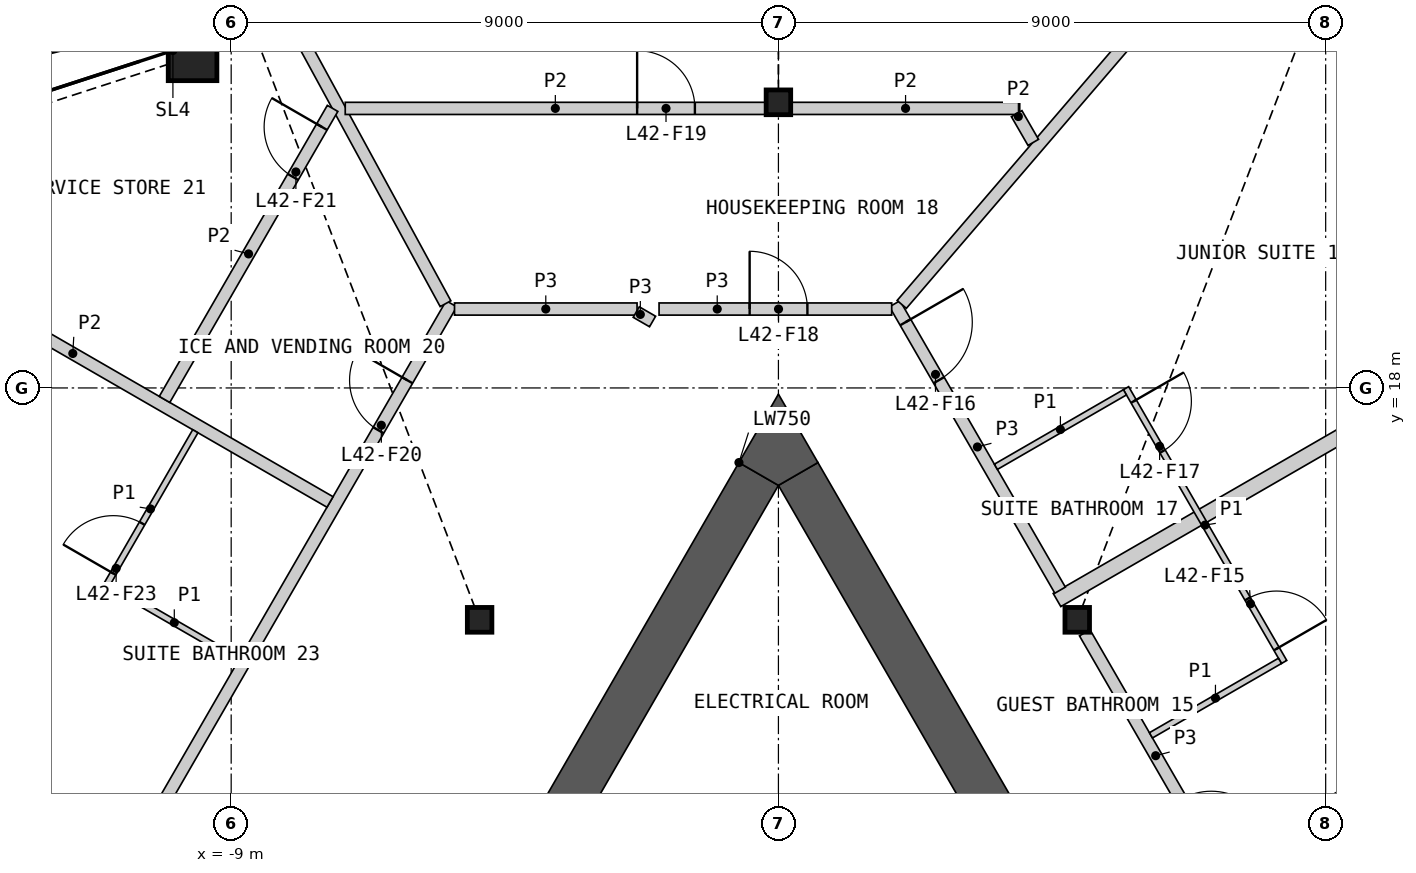
"""IFC4 building model, lengths in metres.
Left out: names, types, materials, properties, quantities, classifications, styles, units other than length and angle.
Written with IfcOpenShell. Run it as: python <this file> out.ifc"""

import sys

from ifc_helpers import new_model, si_unit, direction, frame, frame_2d, origin, origin_2d, place, context, subcontext, project, spatial, polyline, rectangle, hollow_rectangle, i_section, outline, extrude, element, fill, save


model = new_model("IFC4")
c1 = context("Model", 3, precision=1e-05, world=origin(), true_north=direction((0.0, 1.0)))
c2 = subcontext(c1, "Body", "Model", "MODEL_VIEW")
j1 = project(units=[si_unit("LENGTHUNIT", "METRE"), si_unit("PLANEANGLEUNIT", "RADIAN")], contexts=[c1])
p1 = place(None, origin())
s1 = spatial("IfcSite", under=j1, at=p1, CompositionType="ELEMENT")
p2 = place(p1, origin())
s2 = spatial("IfcBuilding", under=s1, at=p2, CompositionType="ELEMENT")
p3 = place(p2, frame((0.0, 0.0, 194.4)))
s3 = spatial("IfcBuildingStorey", under=s2, at=p3, CompositionType="ELEMENT", Elevation=194.4)
p4 = place(p3, frame((-9.635, 23.454, 0.0), z_axis=(0.0, 0.0, 1.0), x_axis=(1.0, 0.0, 0.0)))
e1 = element("IfcColumn", 1, at=p4, inside=s3, PredefinedType="COLUMN", context=c2, shape_type="SweptSolid", body=[
    extrude(hollow_rectangle(XDim=0.8, YDim=0.8, WallThickness=0.05, at=origin_2d()), origin(), (0.0, 0.0, 1.0), 3.6),
])
for number, where, z_axis, x_axis in (
    (2, (0.0, 22.698, 0.0), (0.0, 0.0, 1.0), (1.0, 0.0, 0.0)),
    (3, (-4.914, 14.186, 0.0), (0.0, 0.0, 1.0), (1.0, 0.0, 0.0)),
    (4, (4.914, 14.186, 0.0), (0.0, 0.0, 1.0), (1.0, 0.0, 0.0)),
):
    element("IfcColumn", number, at=place(p3, frame(where, z_axis=z_axis, x_axis=x_axis)), inside=s3, PredefinedType="COLUMN", context=c2, shape_type="SweptSolid", body=[
        extrude(i_section(OverallWidth=0.404, OverallDepth=0.407, WebThickness=0.027, FlangeThickness=0.044, at=origin_2d()), origin(), (0.0, 0.0, 1.0), 3.6),
    ])
p5 = place(p3, frame((6.875, 5.24, 0.0), z_axis=(0.0, 0.0, 1.0), x_axis=(-0.499997217876, 0.866027010039, 0.0)))
e5 = element("IfcWall", 5, at=p5, inside=s3, PredefinedType="SHEAR", context=c2, shape_type="SweptSolid", body=[
    extrude(rectangle(XDim=13.101, YDim=0.75, at=frame_2d((6.551, 0.0))), origin(), (0.0, 0.0, 1.0), 3.25),
])
p6 = place(p3, frame((-0.325, 16.585, 0.0), z_axis=(0.0, 0.0, 1.0), x_axis=(-0.500012199891, -0.86601836006, 0.0)))
e6 = element("IfcWall", 6, at=p6, inside=s3, PredefinedType="SHEAR", context=c2, shape_type="SweptSolid", body=[
    extrude(rectangle(XDim=7.051, YDim=0.75, at=frame_2d((3.525, 0.0))), origin(), (0.0, 0.0, 1.0), 3.25),
])
p7 = place(p3, origin())
e7 = element("IfcWall", 7, at=p7, inside=s3, PredefinedType="SHEAR", context=c2, shape_type="SweptSolid", body=[
    extrude(outline(polyline([(-0.649, 16.773), (0.0, 17.898), (0.649, 16.773), (0.0, 16.398), (-0.649, 16.773)])), origin(), (0.0, 0.0, 1.0), 3.25),
])
p8 = place(p3, frame((-19.476, -5.035, 0.0), z_axis=(0.0, 0.0, 1.0), x_axis=(0.500000757641, 0.86602496636, 0.0)))
e8 = element("IfcWall", 8, at=p8, inside=s3, PredefinedType="PARTITIONING", context=c2, shape_type="SweptSolid", body=[
    extrude(rectangle(XDim=28.198, YDim=0.2, at=frame_2d((14.099, 0.0))), origin(), (0.0, 0.0, 1.0), 3.25),
])
p9 = place(p8, frame((25.796, 0.0, 0.0)))
e9 = element("IfcOpeningElement", 9, at=p9, cuts=e8, PredefinedType="OPENING", context=c2, shape_type="SweptSolid", body=[
    extrude(rectangle(XDim=0.95, YDim=2.1, at=frame_2d((0.475, 1.05))), frame((0.0, 0.11, 0.0), z_axis=(0.0, -1.0, 0.0), x_axis=(1.0, 0.0, 0.0)), (0.0, 0.0, 1.0), 0.22),
])
p10 = place(p8, frame((14.603, 0.0, 0.0)))
e10 = element("IfcOpeningElement", 10, at=p10, cuts=e8, PredefinedType="OPENING", context=c2, shape_type="SweptSolid", body=[
    extrude(rectangle(XDim=1.1, YDim=2.1, at=frame_2d((0.55, 1.05))), frame((0.0, 0.11, 0.0), z_axis=(0.0, -1.0, 0.0), x_axis=(1.0, 0.0, 0.0)), (0.0, 0.0, 1.0), 0.22),
])
p11 = place(p8, frame((11.993, 0.0, 0.0)))
e11 = element("IfcOpeningElement", 11, at=p11, cuts=e8, PredefinedType="OPENING", context=c2, shape_type="SweptSolid", body=[
    extrude(rectangle(XDim=1.1, YDim=2.1, at=frame_2d((0.55, 1.05))), frame((0.0, 0.11, 0.0), z_axis=(0.0, -1.0, 0.0), x_axis=(1.0, 0.0, 0.0)), (0.0, 0.0, 1.0), 0.22),
])
p12 = place(p8, frame((1.452, 0.0, 0.0)))
e12 = element("IfcOpeningElement", 12, at=p12, cuts=e8, PredefinedType="OPENING", context=c2, shape_type="SweptSolid", body=[
    extrude(rectangle(XDim=0.95, YDim=2.1, at=frame_2d((0.475, 1.05))), frame((0.0, 0.11, 0.0), z_axis=(0.0, -1.0, 0.0), x_axis=(1.0, 0.0, 0.0)), (0.0, 0.0, 1.0), 0.22),
])
p13 = place(p3, frame((4.582, 14.512, 0.0), z_axis=(0.0, 0.0, 1.0), x_axis=(0.866027263711, 0.4999967785, 0.0)))
e13 = element("IfcWall", 13, at=p13, inside=s3, PredefinedType="PARTITIONING", context=c2, shape_type="SweptSolid", body=[
    extrude(rectangle(XDim=12.994, YDim=0.25, at=frame_2d((6.497, 0.0))), origin(), (0.0, 0.0, 1.0), 2.404),
])
p14 = place(p3, frame((5.038, 13.972, 0.0), z_axis=(0.0, 0.0, 1.0), x_axis=(0.50000393355, -0.866023132736, 0.0)))
e14 = element("IfcWall", 14, at=p14, inside=s3, PredefinedType="PARTITIONING", context=c2, shape_type="SweptSolid", body=[
    extrude(rectangle(XDim=9.335, YDim=0.2, at=frame_2d((4.667, 0.0))), origin(), (0.0, 0.0, 1.0), 3.25),
])
p15 = place(p14, frame((5.979, 0.0, 0.0)))
e15 = element("IfcOpeningElement", 15, at=p15, cuts=e14, PredefinedType="OPENING", context=c2, shape_type="SweptSolid", body=[
    extrude(rectangle(XDim=1.8, YDim=2.1, at=frame_2d((0.9, 1.05))), frame((0.0, 0.11, 0.0), z_axis=(0.0, -1.0, 0.0), x_axis=(1.0, 0.0, 0.0)), (0.0, 0.0, 1.0), 0.22),
])
p16 = place(p14, frame((3.163, 0.0, 0.0)))
e16 = element("IfcOpeningElement", 16, at=p16, cuts=e14, PredefinedType="OPENING", context=c2, shape_type="SweptSolid", body=[
    extrude(rectangle(XDim=1.0, YDim=2.1, at=frame_2d((0.5, 1.05))), frame((0.0, 0.11, 0.0), z_axis=(0.0, -1.0, 0.0), x_axis=(1.0, 0.0, 0.0)), (0.0, 0.0, 1.0), 0.22),
])
p17 = place(p3, frame((1.913, 19.385, 0.0), z_axis=(0.0, 0.0, 1.0), x_axis=(0.499972435384, -0.866041317638, 0.0)))
e17 = element("IfcWall", 17, at=p17, inside=s3, PredefinedType="PARTITIONING", context=c2, shape_type="SweptSolid", body=[
    extrude(rectangle(XDim=5.439, YDim=0.2, at=frame_2d((2.719, 0.0))), origin(), (0.0, 0.0, 1.0), 3.25),
])
p18 = place(p17, frame((0.351, 0.0, 0.0)))
e18 = element("IfcOpeningElement", 18, at=p18, cuts=e17, PredefinedType="OPENING", context=c2, shape_type="SweptSolid", body=[
    extrude(rectangle(XDim=1.1, YDim=2.1, at=frame_2d((0.55, 1.05))), frame((0.0, 0.11, 0.0), z_axis=(0.0, -1.0, 0.0), x_axis=(1.0, 0.0, 0.0)), (0.0, 0.0, 1.0), 0.22),
])
p19 = place(p3, frame((-1.963, 19.298, 0.0), z_axis=(0.0, 0.0, 1.0), x_axis=(1.0, 0.0, 0.0)))
e19 = element("IfcWall", 19, at=p19, inside=s3, PredefinedType="PARTITIONING", context=c2, shape_type="SweptSolid", body=[
    extrude(rectangle(XDim=3.826, YDim=0.2, at=frame_2d((1.913, 0.0))), origin(), (0.0, 0.0, 1.0), 3.25),
])
p20 = place(p19, frame((1.49, 0.0, 0.0)))
e20 = element("IfcOpeningElement", 20, at=p20, cuts=e19, PredefinedType="OPENING", context=c2, shape_type="SweptSolid", body=[
    extrude(rectangle(XDim=0.95, YDim=2.1, at=frame_2d((0.475, 1.05))), frame((0.0, 0.11, 0.0), z_axis=(0.0, -1.0, 0.0), x_axis=(1.0, 0.0, 0.0)), (0.0, 0.0, 1.0), 0.22),
])
p21 = place(p3, frame((-5.327, 19.298, 0.0), z_axis=(0.0, 0.0, 1.0), x_axis=(1.0, 0.0, 0.0)))
e21 = element("IfcWall", 21, at=p21, inside=s3, PredefinedType="PARTITIONING", context=c2, shape_type="SweptSolid", body=[
    extrude(rectangle(XDim=3.002, YDim=0.2, at=frame_2d((1.501, 0.0))), origin(), (0.0, 0.0, 1.0), 3.25),
])
p22 = place(p3, frame((-2.338, 19.248, 0.0), z_axis=(0.0, 0.0, 1.0), x_axis=(0.866395311824, -0.499358752451, 0.0)))
e22 = element("IfcWall", 22, at=p22, inside=s3, PredefinedType="PARTITIONING", context=c2, shape_type="SweptSolid", body=[
    extrude(rectangle(XDim=0.31, YDim=0.2, at=frame_2d((0.155, 0.0))), origin(), (0.0, 0.0, 1.0), 3.25),
])
p23 = place(p3, frame((2.028, 19.374, 0.0), z_axis=(0.0, 0.0, 1.0), x_axis=(0.651304244859, 0.758816697647, 0.0)))
e23 = element("IfcWall", 23, at=p23, inside=s3, PredefinedType="PARTITIONING", context=c2, shape_type="SweptSolid", body=[
    extrude(rectangle(XDim=13.795, YDim=0.2, at=frame_2d((6.897, 0.0))), origin(), (0.0, 0.0, 1.0), 2.404),
])
p24 = place(p3, frame((-11.021, 29.57, 0.0), z_axis=(0.0, 0.0, 1.0), x_axis=(0.478233946204, -0.878232482147, 0.0)))
e24 = element("IfcWall", 24, at=p24, inside=s3, PredefinedType="PARTITIONING", context=c2, shape_type="SweptSolid", body=[
    extrude(rectangle(XDim=11.596, YDim=0.2, at=frame_2d((5.798, 0.0))), origin(), (0.0, 0.0, 1.0), 2.404),
])
p25 = place(p3, frame((-15.835, 21.009, 0.0), z_axis=(0.0, 0.0, 1.0), x_axis=(0.866024525919, -0.500001520505, 0.0)))
e25 = element("IfcWall", 25, at=p25, inside=s3, PredefinedType="PARTITIONING", context=c2, shape_type="SweptSolid", body=[
    extrude(rectangle(XDim=9.769, YDim=0.2, at=frame_2d((4.885, 0.0))), origin(), (0.0, 0.0, 1.0), 2.404),
])
p26 = place(p3, frame((7.346, 10.175, 0.0), z_axis=(0.0, 0.0, 1.0), x_axis=(0.86602913801, 0.499993532075, 0.0)))
e26 = element("IfcWall", 26, at=p26, inside=s3, PredefinedType="PARTITIONING", context=c2, shape_type="SweptSolid", body=[
    extrude(rectangle(XDim=8.134, YDim=0.2, at=frame_2d((4.067, 0.0))), origin(), (0.0, 0.0, 1.0), 2.404),
])
p27 = place(p3, frame((-7.124, 22.598, 0.0), z_axis=(0.0, 0.0, 1.0), x_axis=(1.0, 0.0, 0.0)))
e27 = element("IfcWall", 27, at=p27, inside=s3, PredefinedType="PARTITIONING", context=c2, shape_type="SweptSolid", body=[
    extrude(rectangle(XDim=6.911, YDim=0.2, at=frame_2d((3.455, 0.0))), origin(), (0.0, 0.0, 1.0), 2.404),
])
p28 = place(p27, frame((4.801, 0.0, 0.0)))
e28 = element("IfcOpeningElement", 28, at=p28, cuts=e27, PredefinedType="OPENING", context=c2, shape_type="SweptSolid", body=[
    extrude(rectangle(XDim=0.95, YDim=2.1, at=frame_2d((0.475, 1.05))), frame((0.0, 0.11, 0.0), z_axis=(0.0, -1.0, 0.0), x_axis=(1.0, 0.0, 0.0)), (0.0, 0.0, 1.0), 0.22),
])
p29 = place(p3, frame((-10.096, 17.811, 0.0), z_axis=(0.0, 0.0, 1.0), x_axis=(0.500015590807, 0.866016402241, 0.0)))
e29 = element("IfcWall", 29, at=p29, inside=s3, PredefinedType="PARTITIONING", context=c2, shape_type="SweptSolid", body=[
    extrude(rectangle(XDim=5.527, YDim=0.2, at=frame_2d((2.764, 0.0))), origin(), (0.0, 0.0, 1.0), 2.404),
])
p30 = place(p29, frame((4.225, 0.0, 0.0)))
e30 = element("IfcOpeningElement", 30, at=p30, cuts=e29, PredefinedType="OPENING", context=c2, shape_type="SweptSolid", body=[
    extrude(rectangle(XDim=0.95, YDim=2.1, at=frame_2d((0.475, 1.05))), frame((0.0, 0.11, 0.0), z_axis=(0.0, -1.0, 0.0), x_axis=(1.0, 0.0, 0.0)), (0.0, 0.0, 1.0), 0.22),
])
p31 = place(p3, frame((0.214, 22.598, 0.0), z_axis=(0.0, 0.0, 1.0), x_axis=(1.0, 0.0, 0.0)))
e31 = element("IfcWall", 31, at=p31, inside=s3, PredefinedType="PARTITIONING", context=c2, shape_type="SweptSolid", body=[
    extrude(rectangle(XDim=3.755, YDim=0.2, at=frame_2d((1.877, 0.0))), origin(), (0.0, 0.0, 1.0), 2.404),
])
p32 = place(p3, frame((3.918, 22.511, 0.0), z_axis=(0.0, 0.0, 1.0), x_axis=(0.500083826171, -0.865977001312, 0.0)))
e32 = element("IfcWall", 32, at=p32, inside=s3, PredefinedType="PARTITIONING", context=c2, shape_type="SweptSolid", body=[
    extrude(rectangle(XDim=0.546, YDim=0.2, at=frame_2d((0.273, 0.0))), origin(), (0.0, 0.0, 1.0), 2.404),
])
p33 = place(p3, frame((5.717, 17.996, 0.0), z_axis=(0.0, 0.0, 1.0), x_axis=(0.500027264788, -0.866009661879, 0.0)))
e33 = element("IfcWall", 33, at=p33, inside=s3, PredefinedType="PARTITIONING", context=c2, shape_type="SweptSolid", body=[
    extrude(rectangle(XDim=5.2, YDim=0.1, at=frame_2d((2.6, 0.0))), origin(), (0.0, 0.0, 1.0), 2.404),
])
p34 = place(p33, frame((4.0, 0.0, 0.0)))
e34 = element("IfcOpeningElement", 34, at=p34, cuts=e33, PredefinedType="OPENING", context=c2, shape_type="SweptSolid", body=[
    extrude(rectangle(XDim=0.95, YDim=2.1, at=frame_2d((0.475, 1.05))), frame((0.0, 0.06, 0.0), z_axis=(0.0, -1.0, 0.0), x_axis=(1.0, 0.0, 0.0)), (0.0, 0.0, 1.0), 0.12),
])
p35 = place(p33, frame((0.25, 0.0, 0.0)))
e35 = element("IfcOpeningElement", 35, at=p35, cuts=e33, PredefinedType="OPENING", context=c2, shape_type="SweptSolid", body=[
    extrude(rectangle(XDim=0.95, YDim=2.1, at=frame_2d((0.475, 1.05))), frame((0.0, 0.06, 0.0), z_axis=(0.0, -1.0, 0.0), x_axis=(1.0, 0.0, 0.0)), (0.0, 0.0, 1.0), 0.12),
])
p36 = place(p3, frame((-11.065, 14.733, 0.0), z_axis=(0.0, 0.0, 1.0), x_axis=(0.500037662692, 0.866003658127, 0.0)))
e36 = element("IfcWall", 36, at=p36, inside=s3, PredefinedType="PARTITIONING", context=c2, shape_type="SweptSolid", body=[
    extrude(rectangle(XDim=2.95, YDim=0.1, at=frame_2d((1.475, 0.0))), origin(), (0.0, 0.0, 1.0), 2.404),
])
p37 = place(p36, frame((0.25, 0.0, 0.0)))
e37 = element("IfcOpeningElement", 37, at=p37, cuts=e36, PredefinedType="OPENING", context=c2, shape_type="SweptSolid", body=[
    extrude(rectangle(XDim=0.95, YDim=2.1, at=frame_2d((0.475, 1.05))), frame((0.0, 0.06, 0.0), z_axis=(0.0, -1.0, 0.0), x_axis=(1.0, 0.0, 0.0)), (0.0, 0.0, 1.0), 0.12),
])
p38 = place(p3, frame((3.576, 16.703, 0.0), z_axis=(0.0, 0.0, 1.0), x_axis=(0.866057815567, 0.499943856944, 0.0)))
e38 = element("IfcWall", 38, at=p38, inside=s3, PredefinedType="PARTITIONING", context=c2, shape_type="SweptSolid", body=[
    extrude(rectangle(XDim=2.45, YDim=0.1, at=frame_2d((1.225, 0.0))), origin(), (0.0, 0.0, 1.0), 2.404),
])
for number, where, z_axis, x_axis in (
    (39, (6.126, 12.286, 0.0), (0.0, 0.0, 1.0), (0.866, 0.5, 0.0)),
    (40, (-10.996, 14.752, 0.0), (0.0, 0.0, 1.0), (0.866, -0.5, 0.0)),
):
    element("IfcWall", number, at=place(p3, frame(where, z_axis=z_axis, x_axis=x_axis)), inside=s3, PredefinedType="PARTITIONING", context=c2, shape_type="SweptSolid", body=[
        extrude(rectangle(XDim=2.45, YDim=0.1, at=frame_2d((1.225, 0.0))), origin(), (0.0, 0.0, 1.0), 2.404),
    ])
p39 = place(p34, origin())
e41 = element("IfcDoor", 41, at=p39, inside=s3, OperationType="SINGLE_SWING_RIGHT", PredefinedType="DOOR", context=c2, shape_type="SweptSolid", body=[
    extrude(rectangle(XDim=0.95, YDim=2.1, at=frame_2d((0.475, 1.05))), frame((0.0, 0.025, 0.0), z_axis=(0.0, -1.0, 0.0), x_axis=(1.0, 0.0, 0.0)), (0.0, 0.0, 1.0), 0.05),
])
fill(e34, e41)
p40 = place(p18, origin())
e42 = element("IfcDoor", 42, at=p40, inside=s3, OperationType="SINGLE_SWING_LEFT", PredefinedType="DOOR", context=c2, shape_type="SweptSolid", body=[
    extrude(rectangle(XDim=1.1, YDim=2.1, at=frame_2d((0.55, 1.05))), frame((0.0, 0.025, 0.0), z_axis=(0.0, -1.0, 0.0), x_axis=(1.0, 0.0, 0.0)), (0.0, 0.0, 1.0), 0.05),
])
fill(e18, e42)
p41 = place(p35, origin())
e43 = element("IfcDoor", 43, at=p41, inside=s3, OperationType="SINGLE_SWING_LEFT", PredefinedType="DOOR", context=c2, shape_type="SweptSolid", body=[
    extrude(rectangle(XDim=0.95, YDim=2.1, at=frame_2d((0.475, 1.05))), frame((0.0, 0.025, 0.0), z_axis=(0.0, -1.0, 0.0), x_axis=(1.0, 0.0, 0.0)), (0.0, 0.0, 1.0), 0.05),
])
fill(e35, e43)
p42 = place(p20, origin())
e44 = element("IfcDoor", 44, at=p42, inside=s3, OperationType="SINGLE_SWING_LEFT", PredefinedType="DOOR", context=c2, shape_type="SweptSolid", body=[
    extrude(rectangle(XDim=0.95, YDim=2.1, at=frame_2d((0.475, 1.05))), frame((0.0, 0.025, 0.0), z_axis=(0.0, -1.0, 0.0), x_axis=(1.0, 0.0, 0.0)), (0.0, 0.0, 1.0), 0.05),
])
fill(e20, e44)
p43 = place(p28, origin())
e45 = element("IfcDoor", 45, at=p43, inside=s3, OperationType="SINGLE_SWING_LEFT", PredefinedType="DOOR", context=c2, shape_type="SweptSolid", body=[
    extrude(rectangle(XDim=0.95, YDim=2.1, at=frame_2d((0.475, 1.05))), frame((0.0, 0.025, 0.0), z_axis=(0.0, -1.0, 0.0), x_axis=(1.0, 0.0, 0.0)), (0.0, 0.0, 1.0), 0.05),
])
fill(e28, e45)
p44 = place(p9, origin())
e46 = element("IfcDoor", 46, at=p44, inside=s3, OperationType="SINGLE_SWING_RIGHT", PredefinedType="DOOR", context=c2, shape_type="SweptSolid", body=[
    extrude(rectangle(XDim=0.95, YDim=2.1, at=frame_2d((0.475, 1.05))), frame((0.0, 0.025, 0.0), z_axis=(0.0, -1.0, 0.0), x_axis=(1.0, 0.0, 0.0)), (0.0, 0.0, 1.0), 0.05),
])
fill(e9, e46)
p45 = place(p30, origin())
e47 = element("IfcDoor", 47, at=p45, inside=s3, OperationType="SINGLE_SWING_RIGHT", PredefinedType="DOOR", context=c2, shape_type="SweptSolid", body=[
    extrude(rectangle(XDim=0.95, YDim=2.1, at=frame_2d((0.475, 1.05))), frame((0.0, 0.025, 0.0), z_axis=(0.0, -1.0, 0.0), x_axis=(1.0, 0.0, 0.0)), (0.0, 0.0, 1.0), 0.05),
])
fill(e30, e47)
p46 = place(p37, origin())
e48 = element("IfcDoor", 48, at=p46, inside=s3, OperationType="SINGLE_SWING_LEFT", PredefinedType="DOOR", context=c2, shape_type="SweptSolid", body=[
    extrude(rectangle(XDim=0.95, YDim=2.1, at=frame_2d((0.475, 1.05))), frame((0.0, 0.025, 0.0), z_axis=(0.0, -1.0, 0.0), x_axis=(1.0, 0.0, 0.0)), (0.0, 0.0, 1.0), 0.05),
])
fill(e37, e48)
save(model, sys.argv[1])
